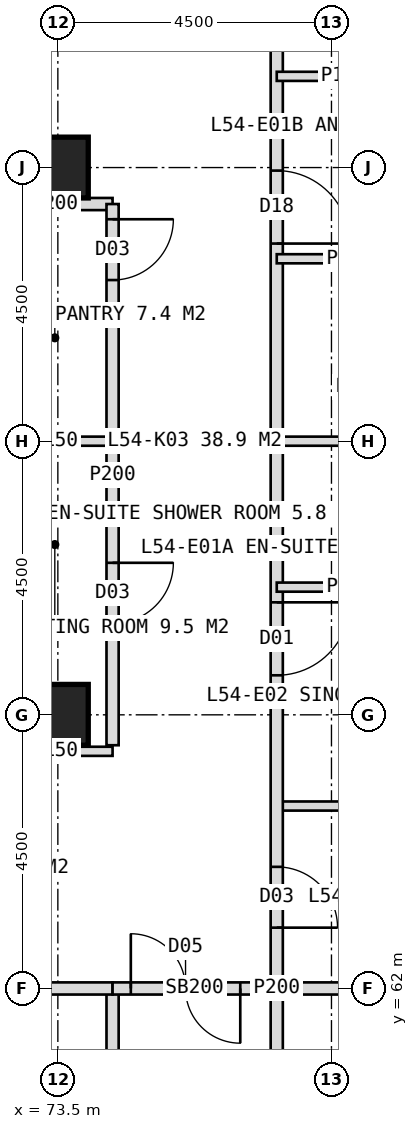
"""IFC4 building model, lengths in metres.
Left out: names, types, materials, properties, quantities, classifications, styles, units other than length and angle.
Written with IfcOpenShell. Run it as: python <this file> out.ifc"""

import sys

from ifc_helpers import new_model, si_unit, direction, frame, frame_2d, origin, origin_2d, place, context, subcontext, project, spatial, rectangle, hollow_rectangle, extrude, element, fill, save


model = new_model("IFC4")
c1 = context("Model", 3, precision=1e-05, world=origin(), true_north=direction((0.0, 1.0)))
c2 = subcontext(c1, "Body", "Model", "MODEL_VIEW")
j1 = project(units=[si_unit("LENGTHUNIT", "METRE"), si_unit("PLANEANGLEUNIT", "RADIAN")], contexts=[c1])
p1 = place(None, origin())
s1 = spatial("IfcSite", under=j1, at=p1, CompositionType="ELEMENT")
p2 = place(p1, origin())
s2 = spatial("IfcBuilding", under=s1, at=p2, CompositionType="ELEMENT")
p3 = place(p2, frame((0.0, 0.0, 225.0)))
s3 = spatial("IfcBuildingStorey", under=s2, at=p3, CompositionType="ELEMENT", Elevation=225.0)
for number, where, z_axis, x_axis in (
    (1, (73.5, 75.5, 0.0), (0.0, 0.0, 1.0), (1.0, 0.0, 0.0)),
    (2, (73.5, 66.5, 0.0), (0.0, 0.0, 1.0), (1.0, 0.0, 0.0)),
):
    element("IfcColumn", number, at=place(p3, frame(where, z_axis=z_axis, x_axis=x_axis)), inside=s3, PredefinedType="COLUMN", context=c2, shape_type="SweptSolid", body=[
        extrude(hollow_rectangle(XDim=1.0, YDim=1.0, WallThickness=0.1, at=origin_2d()), origin(), (0.0, 0.0, 1.0), 4.0),
    ])
p4 = place(p3, frame((72.5, 74.9, 0.0), z_axis=(0.0, 0.0, 1.0), x_axis=(1.0, 0.0, 0.0)))
e3 = element("IfcWall", 3, at=p4, inside=s3, PredefinedType="PARTITIONING", context=c2, shape_type="SweptSolid", body=[
    extrude(rectangle(XDim=1.9, YDim=0.2, at=frame_2d((0.95, 0.0))), origin(), (0.0, 0.0, 1.0), 3.75),
])
for number, where, z_axis, x_axis in (
    (4, (77.1, 71.0, 0.0), (0.0, 0.0, 1.0), (1.0, 0.0, 0.0)),
    (5, (77.1, 65.0, 0.0), (0.0, 0.0, 1.0), (1.0, 0.0, 0.0)),
):
    element("IfcWall", number, at=place(p3, frame(where, z_axis=z_axis, x_axis=x_axis)), inside=s3, PredefinedType="PARTITIONING", context=c2, shape_type="SweptSolid", body=[
        extrude(rectangle(XDim=5.25, YDim=0.15, at=frame_2d((2.625, 0.0))), origin(), (0.0, 0.0, 1.0), 3.75),
    ])
p5 = place(p3, frame((77.1, 62.0, 0.0), z_axis=(0.0, 0.0, 1.0), x_axis=(1.0, 0.0, 0.0)))
e6 = element("IfcWall", 6, at=p5, inside=s3, PredefinedType="SOLIDWALL", context=c2, shape_type="SweptSolid", body=[
    extrude(rectangle(XDim=5.25, YDim=0.2, at=frame_2d((2.625, 0.0))), origin(), (0.0, 0.0, 1.0), 2.95),
])
p6 = place(p3, frame((77.1, 79.1, 0.0), z_axis=(0.0, 0.0, 1.0), x_axis=(0.0, -1.0, 0.0)))
e7 = element("IfcWall", 7, at=p6, inside=s3, PredefinedType="PARTITIONING", context=c2, shape_type="SweptSolid", body=[
    extrude(rectangle(XDim=34.2, YDim=0.2, at=frame_2d((17.1, 0.0))), origin(), (0.0, 0.0, 1.0), 3.75),
])
p7 = place(p6, frame((3.65, 0.0, 0.0)))
e8 = element("IfcOpeningElement", 8, at=p7, cuts=e7, PredefinedType="OPENING", context=c2, shape_type="SweptSolid", body=[
    extrude(rectangle(XDim=1.2, YDim=2.2, at=frame_2d((0.6, 1.1))), frame((0.0, 0.11, 0.0), z_axis=(0.0, -1.0, 0.0), x_axis=(1.0, 0.0, 0.0)), (0.0, 0.0, 1.0), 0.22),
])
p8 = place(p6, frame((10.75, 0.0, 0.0)))
e9 = element("IfcOpeningElement", 9, at=p8, cuts=e7, PredefinedType="OPENING", context=c2, shape_type="SweptSolid", body=[
    extrude(rectangle(XDim=1.2, YDim=2.2, at=frame_2d((0.6, 1.1))), frame((0.0, 0.11, 0.0), z_axis=(0.0, -1.0, 0.0), x_axis=(1.0, 0.0, 0.0)), (0.0, 0.0, 1.0), 0.22),
])
p9 = place(p6, frame((15.1, 0.0, 0.0)))
e10 = element("IfcOpeningElement", 10, at=p9, cuts=e7, PredefinedType="OPENING", context=c2, shape_type="SweptSolid", body=[
    extrude(rectangle(XDim=1.0, YDim=2.1, at=frame_2d((0.5, 1.05))), frame((0.0, 0.11, 0.0), z_axis=(0.0, -1.0, 0.0), x_axis=(1.0, 0.0, 0.0)), (0.0, 0.0, 1.0), 0.22),
])
p10 = place(p6, frame((19.75, 0.0, 0.0)))
e11 = element("IfcOpeningElement", 11, at=p10, cuts=e7, PredefinedType="OPENING", context=c2, shape_type="SweptSolid", body=[
    extrude(rectangle(XDim=1.2, YDim=2.2, at=frame_2d((0.6, 1.1))), frame((0.0, 0.11, 0.0), z_axis=(0.0, -1.0, 0.0), x_axis=(1.0, 0.0, 0.0)), (0.0, 0.0, 1.0), 0.22),
])
p11 = place(p6, frame((30.35, 0.0, 0.0)))
e12 = element("IfcOpeningElement", 12, at=p11, cuts=e7, PredefinedType="OPENING", context=c2, shape_type="SweptSolid", body=[
    extrude(rectangle(XDim=1.2, YDim=2.2, at=frame_2d((0.6, 1.1))), frame((0.0, 0.11, 0.0), z_axis=(0.0, -1.0, 0.0), x_axis=(1.0, 0.0, 0.0)), (0.0, 0.0, 1.0), 0.22),
])
for number, where, z_axis, x_axis in (
    (13, (77.1, 74.0, 0.0), (0.0, 0.0, 1.0), (1.0, 0.0, 0.0)),
    (14, (77.1, 77.0, 0.0), (0.0, 0.0, 1.0), (1.0, 0.0, 0.0)),
    (15, (77.1, 68.6, 0.0), (0.0, 0.0, 1.0), (1.0, 0.0, 0.0)),
):
    element("IfcWall", number, at=place(p3, frame(where, z_axis=z_axis, x_axis=x_axis)), inside=s3, PredefinedType="PARTITIONING", context=c2, shape_type="SweptSolid", body=[
        extrude(rectangle(XDim=2.4, YDim=0.15, at=frame_2d((1.2, 0.0))), origin(), (0.0, 0.0, 1.0), 3.75),
    ])
p12 = place(p3, frame((72.5, 71.0, 0.0), z_axis=(0.0, 0.0, 1.0), x_axis=(1.0, 0.0, 0.0)))
e16 = element("IfcWall", 16, at=p12, inside=s3, PredefinedType="PARTITIONING", context=c2, shape_type="SweptSolid", body=[
    extrude(rectangle(XDim=1.9, YDim=0.15, at=frame_2d((0.95, 0.0))), origin(), (0.0, 0.0, 1.0), 3.75),
])
p13 = place(p3, frame((74.4, 74.9, 0.0), z_axis=(0.0, 0.0, 1.0), x_axis=(0.0, -1.0, 0.0)))
e17 = element("IfcWall", 17, at=p13, inside=s3, PredefinedType="PARTITIONING", context=c2, shape_type="SweptSolid", body=[
    extrude(rectangle(XDim=8.9, YDim=0.2, at=frame_2d((4.45, 0.0))), origin(), (0.0, 0.0, 1.0), 3.75),
])
p14 = place(p13, frame((0.25, 0.0, 0.0)))
e18 = element("IfcOpeningElement", 18, at=p14, cuts=e17, PredefinedType="OPENING", context=c2, shape_type="SweptSolid", body=[
    extrude(rectangle(XDim=1.0, YDim=2.1, at=frame_2d((0.5, 1.05))), frame((0.0, 0.11, 0.0), z_axis=(0.0, -1.0, 0.0), x_axis=(1.0, 0.0, 0.0)), (0.0, 0.0, 1.0), 0.22),
])
p15 = place(p13, frame((5.9, 0.0, 0.0)))
e19 = element("IfcOpeningElement", 19, at=p15, cuts=e17, PredefinedType="OPENING", context=c2, shape_type="SweptSolid", body=[
    extrude(rectangle(XDim=1.0, YDim=2.1, at=frame_2d((0.5, 1.05))), frame((0.0, 0.11, 0.0), z_axis=(0.0, -1.0, 0.0), x_axis=(1.0, 0.0, 0.0)), (0.0, 0.0, 1.0), 0.22),
])
p16 = place(p3, frame((74.4, 62.0, 0.0), z_axis=(0.0, 0.0, 1.0), x_axis=(0.0, -1.0, 0.0)))
e20 = element("IfcWall", 20, at=p16, inside=s3, PredefinedType="PARTITIONING", context=c2, shape_type="SweptSolid", body=[
    extrude(rectangle(XDim=14.4, YDim=0.2, at=frame_2d((7.2, 0.0))), origin(), (0.0, 0.0, 1.0), 3.75),
])
p17 = place(p16, frame((2.5, 0.0, 0.0)))
e21 = element("IfcOpeningElement", 21, at=p17, cuts=e20, PredefinedType="OPENING", context=c2, shape_type="SweptSolid", body=[
    extrude(rectangle(XDim=1.0, YDim=2.1, at=frame_2d((0.5, 1.05))), frame((0.0, 0.11, 0.0), z_axis=(0.0, -1.0, 0.0), x_axis=(1.0, 0.0, 0.0)), (0.0, 0.0, 1.0), 0.22),
])
p18 = place(p16, frame((7.0, 0.0, 0.0)))
e22 = element("IfcOpeningElement", 22, at=p18, cuts=e20, PredefinedType="OPENING", context=c2, shape_type="SweptSolid", body=[
    extrude(rectangle(XDim=1.0, YDim=2.1, at=frame_2d((0.5, 1.05))), frame((0.0, 0.11, 0.0), z_axis=(0.0, -1.0, 0.0), x_axis=(1.0, 0.0, 0.0)), (0.0, 0.0, 1.0), 0.22),
])
p19 = place(p16, frame((11.2, 0.0, 0.0)))
e23 = element("IfcOpeningElement", 23, at=p19, cuts=e20, PredefinedType="OPENING", context=c2, shape_type="SweptSolid", body=[
    extrude(rectangle(XDim=1.0, YDim=2.1, at=frame_2d((0.5, 1.05))), frame((0.0, 0.11, 0.0), z_axis=(0.0, -1.0, 0.0), x_axis=(1.0, 0.0, 0.0)), (0.0, 0.0, 1.0), 0.22),
])
p20 = place(p3, frame((72.5, 65.9, 0.0), z_axis=(0.0, 0.0, 1.0), x_axis=(1.0, 0.0, 0.0)))
e24 = element("IfcWall", 24, at=p20, inside=s3, PredefinedType="PARTITIONING", context=c2, shape_type="SweptSolid", body=[
    extrude(rectangle(XDim=1.9, YDim=0.15, at=frame_2d((0.95, 0.0))), origin(), (0.0, 0.0, 1.0), 3.75),
])
p21 = place(p3, frame((69.0, 62.0, 0.0), z_axis=(0.0, 0.0, 1.0), x_axis=(1.0, 0.0, 0.0)))
e25 = element("IfcWall", 25, at=p21, inside=s3, PredefinedType="SOLIDWALL", context=c2, shape_type="SweptSolid", body=[
    extrude(rectangle(XDim=5.4, YDim=0.2, at=frame_2d((2.7, 0.0))), origin(), (0.0, 0.0, 1.0), 2.95),
])
p22 = place(p3, frame((74.4, 62.0, 0.0), z_axis=(0.0, 0.0, 1.0), x_axis=(1.0, 0.0, 0.0)))
e26 = element("IfcWall", 26, at=p22, inside=s3, PredefinedType="SOLIDWALL", context=c2, shape_type="SweptSolid", body=[
    extrude(rectangle(XDim=2.7, YDim=0.2, at=frame_2d((1.35, 0.0))), origin(), (0.0, 0.0, 1.0), 2.95),
])
p23 = place(p22, frame((0.3, 0.0, 0.0)))
e27 = element("IfcOpeningElement", 27, at=p23, cuts=e26, PredefinedType="OPENING", context=c2, shape_type="SweptSolid", body=[
    extrude(rectangle(XDim=1.8, YDim=2.2, at=frame_2d((0.9, 1.1))), frame((0.0, 0.11, 0.0), z_axis=(0.0, -1.0, 0.0), x_axis=(1.0, 0.0, 0.0)), (0.0, 0.0, 1.0), 0.22),
])
p24 = place(p14, origin())
e28 = element("IfcDoor", 28, at=p24, inside=s3, OperationType="SINGLE_SWING_LEFT", PredefinedType="DOOR", context=c2, shape_type="SweptSolid", body=[
    extrude(rectangle(XDim=1.0, YDim=2.1, at=frame_2d((0.5, 1.05))), frame((0.0, 0.025, 0.0), z_axis=(0.0, -1.0, 0.0), x_axis=(1.0, 0.0, 0.0)), (0.0, 0.0, 1.0), 0.05),
])
fill(e18, e28)
p25 = place(p7, origin())
e29 = element("IfcDoor", 29, at=p25, inside=s3, OperationType="SINGLE_SWING_RIGHT", PredefinedType="DOOR", context=c2, shape_type="SweptSolid", body=[
    extrude(rectangle(XDim=1.2, YDim=2.2, at=frame_2d((0.6, 1.1))), frame((0.0, 0.025, 0.0), z_axis=(0.0, -1.0, 0.0), x_axis=(1.0, 0.0, 0.0)), (0.0, 0.0, 1.0), 0.05),
])
fill(e8, e29)
p26 = place(p8, origin())
e30 = element("IfcDoor", 30, at=p26, inside=s3, OperationType="SINGLE_SWING_LEFT", PredefinedType="DOOR", context=c2, shape_type="SweptSolid", body=[
    extrude(rectangle(XDim=1.2, YDim=2.2, at=frame_2d((0.6, 1.1))), frame((0.0, 0.025, 0.0), z_axis=(0.0, -1.0, 0.0), x_axis=(1.0, 0.0, 0.0)), (0.0, 0.0, 1.0), 0.05),
])
fill(e9, e30)
p27 = place(p9, origin())
e31 = element("IfcDoor", 31, at=p27, inside=s3, OperationType="SINGLE_SWING_RIGHT", PredefinedType="DOOR", context=c2, shape_type="SweptSolid", body=[
    extrude(rectangle(XDim=1.0, YDim=2.1, at=frame_2d((0.5, 1.05))), frame((0.0, 0.025, 0.0), z_axis=(0.0, -1.0, 0.0), x_axis=(1.0, 0.0, 0.0)), (0.0, 0.0, 1.0), 0.05),
])
fill(e10, e31)
p28 = place(p15, origin())
e32 = element("IfcDoor", 32, at=p28, inside=s3, OperationType="SINGLE_SWING_LEFT", PredefinedType="DOOR", context=c2, shape_type="SweptSolid", body=[
    extrude(rectangle(XDim=1.0, YDim=2.1, at=frame_2d((0.5, 1.05))), frame((0.0, 0.025, 0.0), z_axis=(0.0, -1.0, 0.0), x_axis=(1.0, 0.0, 0.0)), (0.0, 0.0, 1.0), 0.05),
])
fill(e19, e32)
p29 = place(p23, origin())
e33 = element("IfcDoor", 33, at=p29, inside=s3, OperationType="DOUBLE_DOOR_DOUBLE_SWING", PredefinedType="DOOR", context=c2, shape_type="SweptSolid", body=[
    extrude(rectangle(XDim=1.8, YDim=2.2, at=frame_2d((0.9, 1.1))), frame((0.0, 0.025, 0.0), z_axis=(0.0, -1.0, 0.0), x_axis=(1.0, 0.0, 0.0)), (0.0, 0.0, 1.0), 0.05),
])
fill(e27, e33)
save(model, sys.argv[1])
